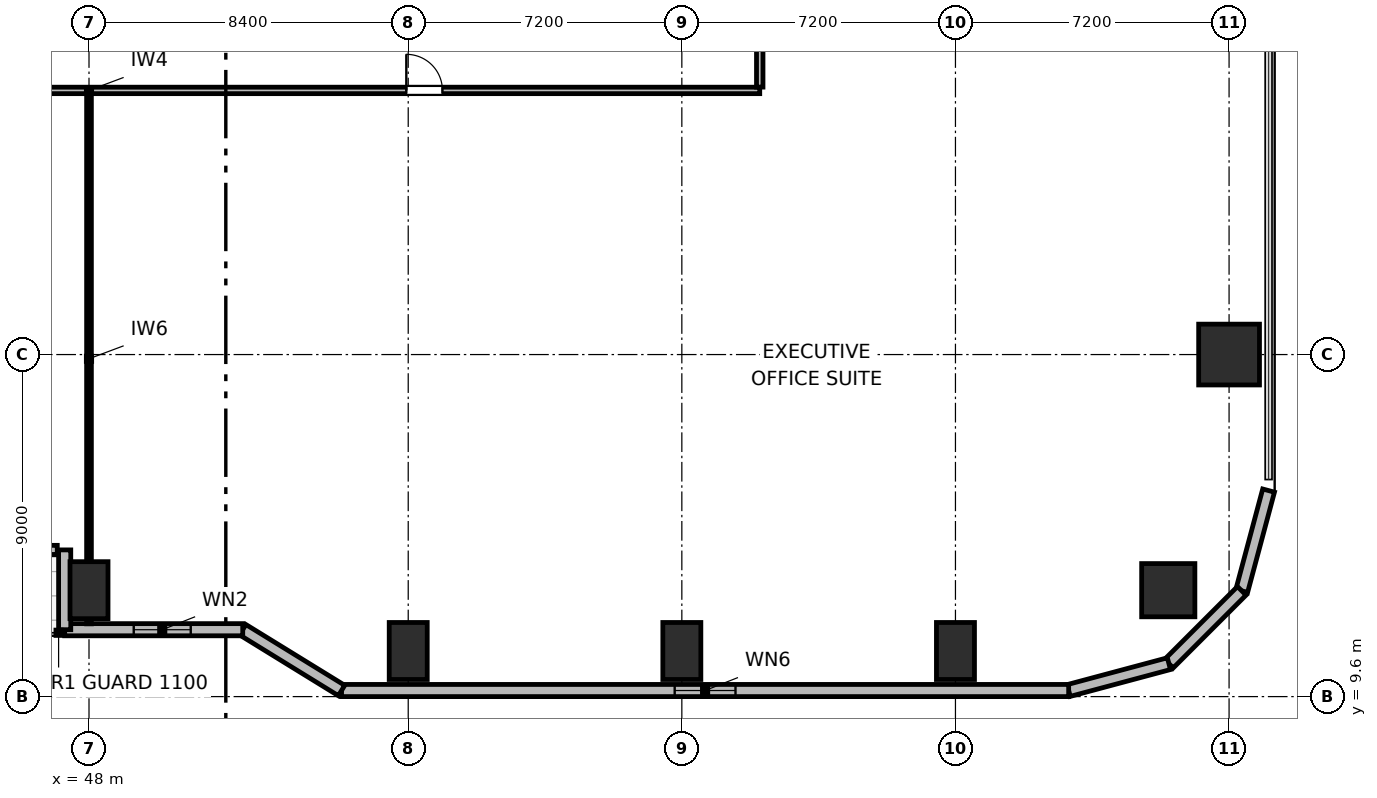
"""IFC4 building model, lengths in metres.
Left out: names, types, materials, properties, quantities, classifications, styles, units other than length and angle.
Written with IfcOpenShell. Run it as: python <this file> out.ifc"""

import sys

from ifc_helpers import new_model, si_unit, direction, frame, frame_2d, origin, origin_2d, place, context, subcontext, project, spatial, rectangle, circle, extrude, element, fill, save


model = new_model("IFC4")
c1 = context("Model", 3, precision=1e-05, world=origin(), true_north=direction((0.0, 1.0)))
c2 = subcontext(c1, "Body", "Model", "MODEL_VIEW")
j1 = project(units=[si_unit("LENGTHUNIT", "METRE"), si_unit("PLANEANGLEUNIT", "RADIAN")], contexts=[c1])
p1 = place(None, origin())
s1 = spatial("IfcSite", under=j1, at=p1, CompositionType="ELEMENT")
p2 = place(p1, origin())
s2 = spatial("IfcBuilding", under=s1, at=p2, CompositionType="ELEMENT")
p3 = place(p2, frame((0.0, 0.0, 21.6)))
s3 = spatial("IfcBuildingStorey", under=s2, at=p3, CompositionType="ELEMENT", Elevation=21.6)
p4 = place(p3, frame((76.4, 12.4, 0.0), z_axis=(0.0, 0.0, 1.0), x_axis=(1.0, 0.0, 0.0)))
e1 = element("IfcColumn", 1, at=p4, inside=s3, PredefinedType="COLUMN", context=c2, shape_type="SweptSolid", body=[
    extrude(circle(Radius=0.7, at=origin_2d()), origin(), (0.0, 0.0, 1.0), 3.9),
])
for number, where, z_axis, x_axis in (
    (2, (48.0, 12.4, 0.0), (0.0, 0.0, 1.0), (1.0, 0.0, 0.0)),
    (3, (56.4, 10.8, 0.0), (0.0, 0.0, 1.0), (1.0, 0.0, 0.0)),
    (4, (63.6, 10.8, 0.0), (0.0, 0.0, 1.0), (1.0, 0.0, 0.0)),
    (5, (70.8, 10.8, 0.0), (0.0, 0.0, 1.0), (1.0, 0.0, 0.0)),
):
    element("IfcColumn", number, at=place(p3, frame(where, z_axis=z_axis, x_axis=x_axis)), inside=s3, PredefinedType="COLUMN", context=c2, shape_type="SweptSolid", body=[
        extrude(rectangle(XDim=1.0, YDim=1.5, at=origin_2d()), origin(), (0.0, 0.0, 1.0), 3.9),
    ])
p5 = place(p3, frame((78.0, 18.6, 0.0), z_axis=(0.0, 0.0, 1.0), x_axis=(1.0, 0.0, 0.0)))
e6 = element("IfcColumn", 6, at=p5, inside=s3, PredefinedType="COLUMN", context=c2, shape_type="SweptSolid", body=[
    extrude(rectangle(XDim=1.6, YDim=1.6, at=origin_2d()), origin(), (0.0, 0.0, 1.0), 3.9),
])
p6 = place(p3, frame((79.04, 15.021, 0.0), z_axis=(0.0, 0.0, 1.0), x_axis=(-0.25869736047, -0.965958423373, 0.0)))
e7 = element("IfcWall", 7, at=p6, inside=s3, PredefinedType="SOLIDWALL", context=c2, shape_type="SweptSolid", body=[
    extrude(rectangle(XDim=2.731, YDim=0.32, at=frame_2d((1.366, 0.0))), origin(), (0.0, 0.0, 1.0), 3.64),
])
p7 = place(p3, frame((78.333, 12.383, 0.0), z_axis=(0.0, 0.0, 1.0), x_axis=(-0.707106781187, -0.707106781187, 0.0)))
e8 = element("IfcWall", 8, at=p7, inside=s3, PredefinedType="SOLIDWALL", context=c2, shape_type="SweptSolid", body=[
    extrude(rectangle(XDim=2.71, YDim=0.32, at=frame_2d((1.355, 0.0))), origin(), (0.0, 0.0, 1.0), 3.64),
])
p8 = place(p3, frame((76.417, 10.467, 0.0), z_axis=(0.0, 0.0, 1.0), x_axis=(-0.965964405026, -0.25867502435, 0.0)))
e9 = element("IfcWall", 9, at=p8, inside=s3, PredefinedType="SOLIDWALL", context=c2, shape_type="SweptSolid", body=[
    extrude(rectangle(XDim=2.731, YDim=0.32, at=frame_2d((1.366, 0.0))), origin(), (0.0, 0.0, 1.0), 3.64),
])
p9 = place(p3, frame((73.779, 9.76, 0.0), z_axis=(0.0, 0.0, 1.0), x_axis=(-1.0, 0.0, 0.0)))
e10 = element("IfcWall", 10, at=p9, inside=s3, PredefinedType="SOLIDWALL", context=c2, shape_type="SweptSolid", body=[
    extrude(rectangle(XDim=19.134, YDim=0.32, at=frame_2d((9.567, 0.0))), origin(), (0.0, 0.0, 1.0), 3.64),
])
p10 = place(p9, frame((8.767, 0.0, 0.85)))
e11 = element("IfcOpeningElement", 11, at=p10, cuts=e10, PredefinedType="OPENING", context=c2, shape_type="SweptSolid", body=[
    extrude(rectangle(XDim=1.6, YDim=1.0, at=frame_2d((0.8, 0.5))), frame((0.0, 0.17, 0.0), z_axis=(0.0, -1.0, 0.0), x_axis=(1.0, 0.0, 0.0)), (0.0, 0.0, 1.0), 0.34),
])
p11 = place(p3, frame((54.645, 9.76, 0.0), z_axis=(0.0, 0.0, 1.0), x_axis=(-0.851630857047, 0.524142044989, 0.0)))
e12 = element("IfcWall", 12, at=p11, inside=s3, PredefinedType="SOLIDWALL", context=c2, shape_type="SweptSolid", body=[
    extrude(rectangle(XDim=3.053, YDim=0.32, at=frame_2d((1.526, 0.0))), origin(), (0.0, 0.0, 1.0), 2.875),
])
p12 = place(p3, frame((52.045, 11.36, 0.0), z_axis=(0.0, 0.0, 1.0), x_axis=(-1.0, 0.0, 0.0)))
e13 = element("IfcWall", 13, at=p12, inside=s3, PredefinedType="SOLIDWALL", context=c2, shape_type="SweptSolid", body=[
    extrude(rectangle(XDim=4.685, YDim=0.32, at=frame_2d((2.343, 0.0))), origin(), (0.0, 0.0, 1.0), 2.875),
])
p13 = place(p12, frame((1.368, 0.0, 0.85)))
e14 = element("IfcOpeningElement", 14, at=p13, cuts=e13, PredefinedType="OPENING", context=c2, shape_type="SweptSolid", body=[
    extrude(rectangle(XDim=1.5, YDim=1.1, at=frame_2d((0.75, 0.55))), frame((0.0, 0.17, 0.0), z_axis=(0.0, -1.0, 0.0), x_axis=(1.0, 0.0, 0.0)), (0.0, 0.0, 1.0), 0.34),
])
p14 = place(p3, frame((47.36, 11.36, 0.0), z_axis=(0.0, 0.0, 1.0), x_axis=(0.0, 1.0, 0.0)))
e15 = element("IfcWall", 15, at=p14, inside=s3, PredefinedType="SOLIDWALL", context=c2, shape_type="SweptSolid", body=[
    extrude(rectangle(XDim=2.1, YDim=0.32, at=frame_2d((1.05, 0.0))), origin(), (0.0, 0.0, 1.0), 2.875),
])
p15 = place(p3, frame((47.165, 13.46, 0.0), z_axis=(0.0, 0.0, 1.0), x_axis=(-1.0, 0.0, 0.0)))
e16 = element("IfcWall", 16, at=p15, inside=s3, PredefinedType="SOLIDWALL", context=c2, shape_type="SweptSolid", body=[
    extrude(rectangle(XDim=4.53, YDim=0.24, at=frame_2d((2.265, 0.0))), origin(), (0.0, 0.0, 1.0), 3.64),
])
p16 = place(p15, frame((1.715, 0.0, 0.0)))
e17 = element("IfcOpeningElement", 17, at=p16, cuts=e16, PredefinedType="OPENING", context=c2, shape_type="SweptSolid", body=[
    extrude(rectangle(XDim=1.1, YDim=2.04, at=frame_2d((0.55, 1.02))), frame((0.0, 0.13, 0.0), z_axis=(0.0, -1.0, 0.0), x_axis=(1.0, 0.0, 0.0)), (0.0, 0.0, 1.0), 0.26),
])
p17 = place(p3, frame((30.35, 25.55, 0.0), z_axis=(0.0, 0.0, 1.0), x_axis=(1.0, 0.0, 0.0)))
e18 = element("IfcWall", 18, at=p17, inside=s3, PredefinedType="PARTITIONING", context=c2, shape_type="SweptSolid", body=[
    extrude(rectangle(XDim=35.3, YDim=0.17, at=frame_2d((17.65, 0.0))), origin(), (0.0, 0.0, 1.0), 3.64),
])
p18 = place(p17, frame((8.35, 0.0, 0.0)))
e19 = element("IfcOpeningElement", 19, at=p18, cuts=e18, PredefinedType="OPENING", context=c2, shape_type="SweptSolid", body=[
    extrude(rectangle(XDim=0.95, YDim=2.04, at=frame_2d((0.475, 1.02))), frame((0.0, 0.095, 0.0), z_axis=(0.0, -1.0, 0.0), x_axis=(1.0, 0.0, 0.0)), (0.0, 0.0, 1.0), 0.19),
])
p19 = place(p17, frame((26.0, 0.0, 0.0)))
e20 = element("IfcOpeningElement", 20, at=p19, cuts=e18, PredefinedType="OPENING", context=c2, shape_type="SweptSolid", body=[
    extrude(rectangle(XDim=0.95, YDim=2.04, at=frame_2d((0.475, 1.02))), frame((0.0, 0.095, 0.0), z_axis=(0.0, -1.0, 0.0), x_axis=(1.0, 0.0, 0.0)), (0.0, 0.0, 1.0), 0.19),
])
p20 = place(p3, frame((65.65, 25.637, 0.0), z_axis=(0.0, 0.0, 1.0), x_axis=(0.0, 1.0, 0.0)))
e21 = element("IfcWall", 21, at=p20, inside=s3, PredefinedType="PARTITIONING", context=c2, shape_type="SweptSolid", body=[
    extrude(rectangle(XDim=20.726, YDim=0.17, at=frame_2d((10.363, 0.0))), origin(), (0.0, 0.0, 1.0), 3.64),
])
p21 = place(p20, frame((4.163, 0.0, 0.0)))
e22 = element("IfcOpeningElement", 22, at=p21, cuts=e21, PredefinedType="OPENING", context=c2, shape_type="SweptSolid", body=[
    extrude(rectangle(XDim=0.95, YDim=2.04, at=frame_2d((0.475, 1.02))), frame((0.0, 0.095, 0.0), z_axis=(0.0, -1.0, 0.0), x_axis=(1.0, 0.0, 0.0)), (0.0, 0.0, 1.0), 0.19),
])
p22 = place(p20, frame((14.613, 0.0, 0.0)))
e23 = element("IfcOpeningElement", 23, at=p22, cuts=e21, PredefinedType="OPENING", context=c2, shape_type="SweptSolid", body=[
    extrude(rectangle(XDim=0.95, YDim=2.04, at=frame_2d((0.475, 1.02))), frame((0.0, 0.095, 0.0), z_axis=(0.0, -1.0, 0.0), x_axis=(1.0, 0.0, 0.0)), (0.0, 0.0, 1.0), 0.19),
])
p23 = place(p3, frame((48.0, 11.515, 0.0), z_axis=(0.0, 0.0, 1.0), x_axis=(0.0, 1.0, 0.0)))
e24 = element("IfcWall", 24, at=p23, inside=s3, PredefinedType="PARTITIONING", context=c2, shape_type="SweptSolid", body=[
    extrude(rectangle(XDim=13.948, YDim=0.125, at=frame_2d((6.974, 0.0))), origin(), (0.0, 0.0, 1.0), 2.93),
])
p24 = place(p10, origin())
e25 = element("IfcWindow", 25, at=p24, inside=s3, PartitioningType="SINGLE_PANEL", PredefinedType="WINDOW", context=c2, shape_type="SweptSolid", body=[
    extrude(rectangle(XDim=1.6, YDim=1.0, at=frame_2d((0.8, 0.5))), frame((0.0, 0.03, 0.0), z_axis=(0.0, -1.0, 0.0), x_axis=(1.0, 0.0, 0.0)), (0.0, 0.0, 1.0), 0.06),
])
fill(e11, e25)
p25 = place(p13, origin())
e26 = element("IfcWindow", 26, at=p25, inside=s3, PartitioningType="SINGLE_PANEL", PredefinedType="WINDOW", context=c2, shape_type="SweptSolid", body=[
    extrude(rectangle(XDim=1.5, YDim=1.1, at=frame_2d((0.75, 0.55))), frame((0.0, 0.03, 0.0), z_axis=(0.0, -1.0, 0.0), x_axis=(1.0, 0.0, 0.0)), (0.0, 0.0, 1.0), 0.06),
])
fill(e14, e26)
p26 = place(p19, origin())
e27 = element("IfcDoor", 27, at=p26, inside=s3, OperationType="SINGLE_SWING_LEFT", PredefinedType="DOOR", context=c2, shape_type="SweptSolid", body=[
    extrude(rectangle(XDim=0.95, YDim=2.04, at=frame_2d((0.475, 1.02))), frame((0.0, 0.025, 0.0), z_axis=(0.0, -1.0, 0.0), x_axis=(1.0, 0.0, 0.0)), (0.0, 0.0, 1.0), 0.05),
])
fill(e20, e27)
save(model, sys.argv[1])
